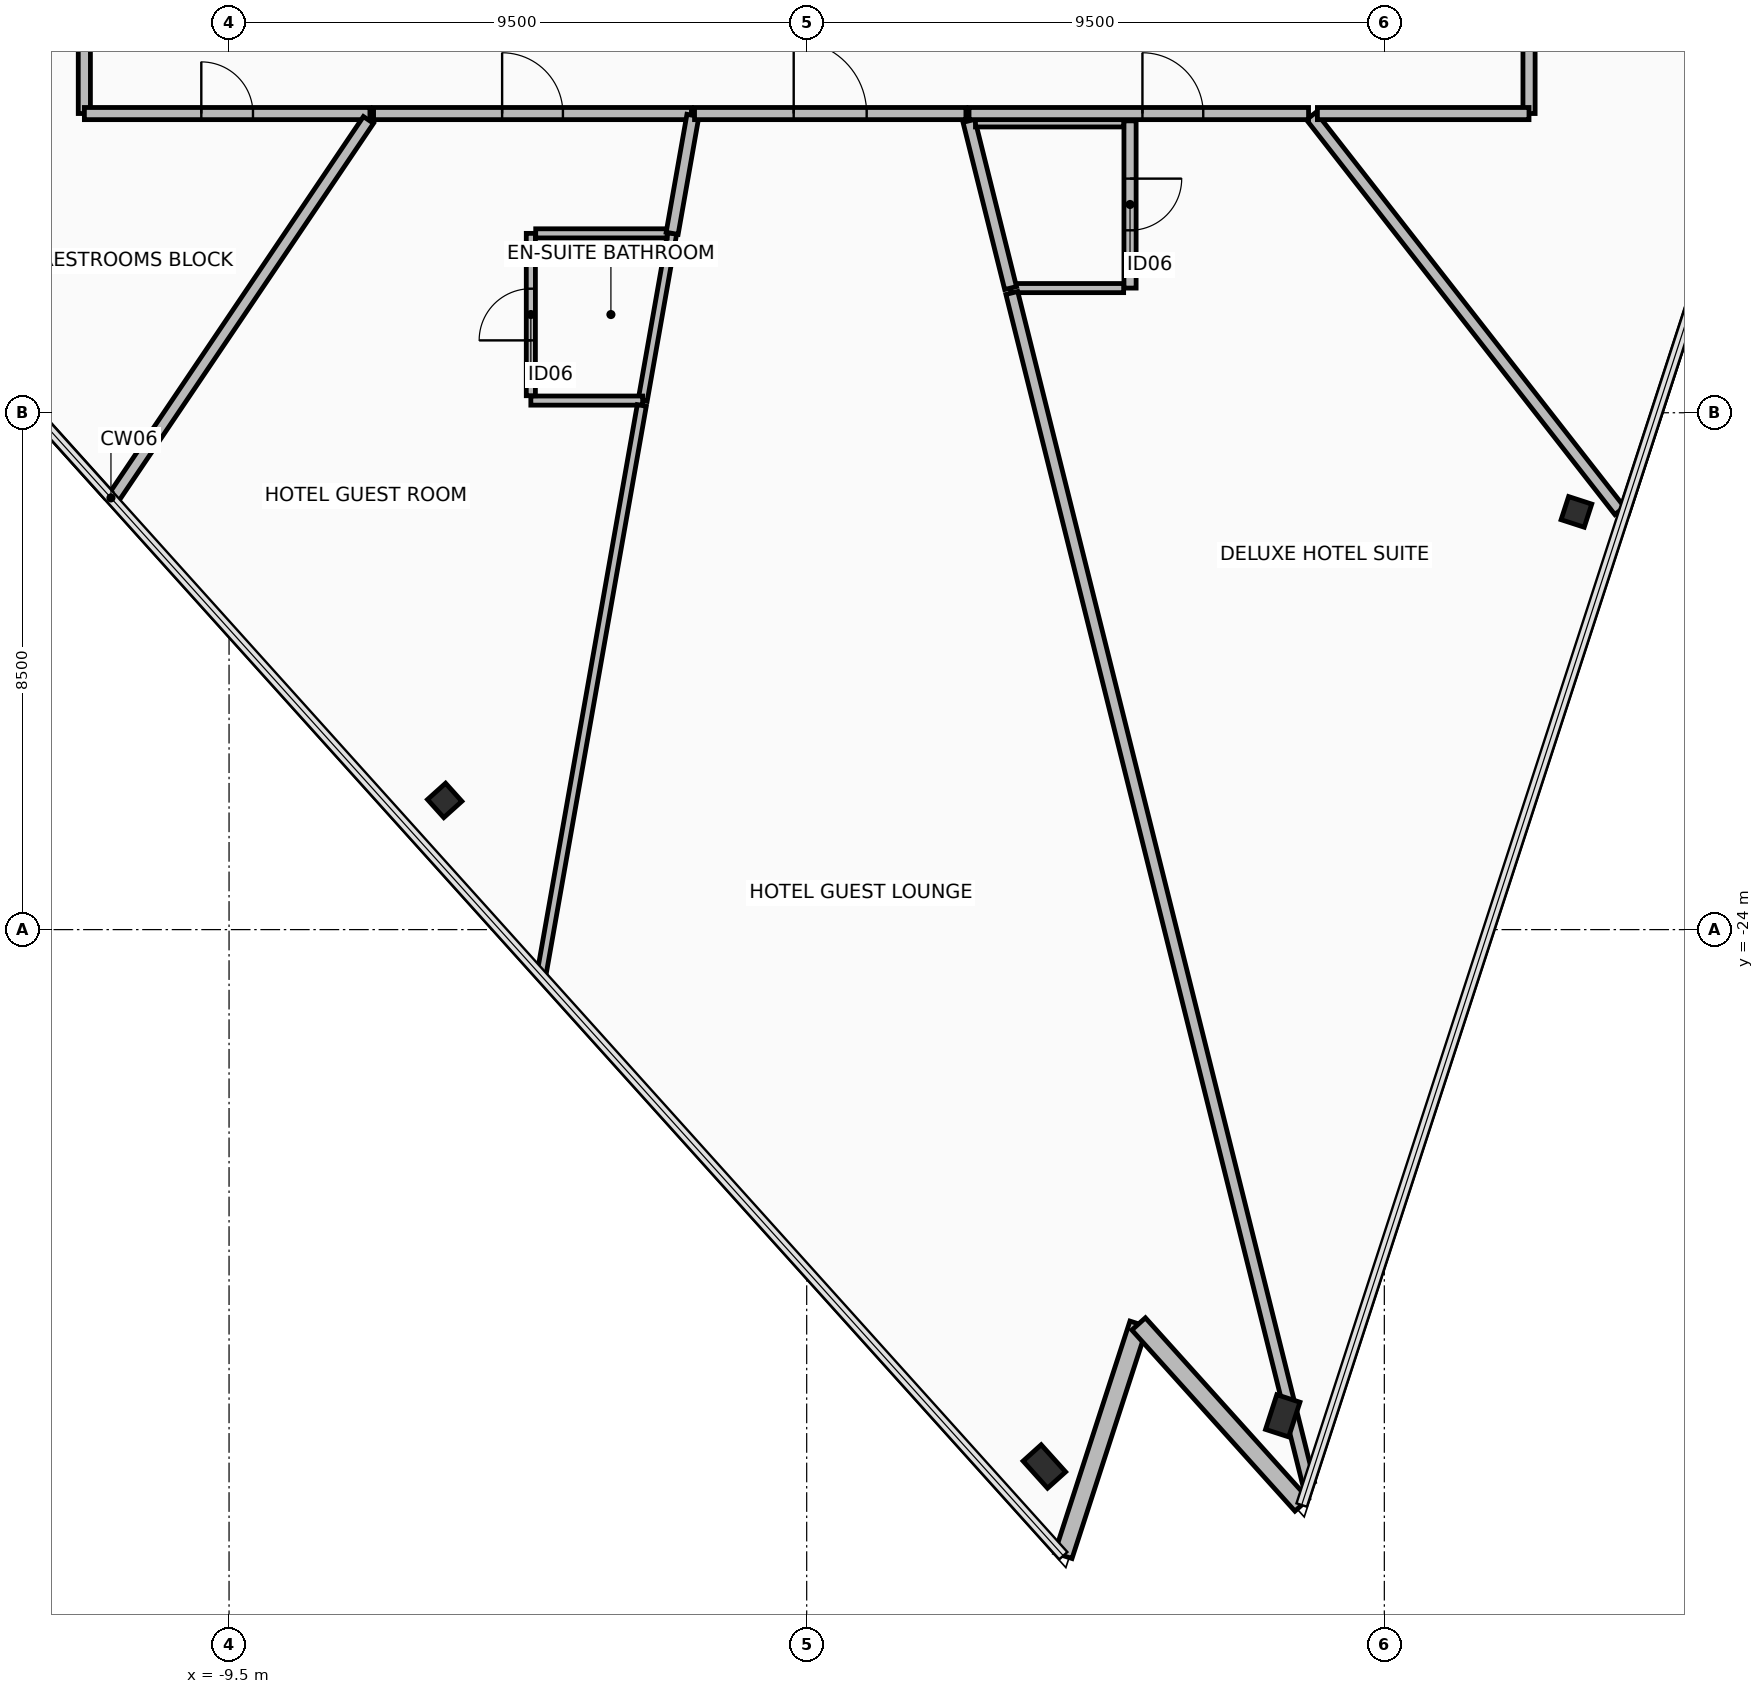
"""IFC4 building model, lengths in metres.
Left out: names, types, materials, properties, quantities, classifications, styles, units other than length and angle.
Written with IfcOpenShell. Run it as: python <this file> out.ifc"""

import sys

from ifc_helpers import new_model, si_unit, direction, frame, frame_2d, origin, origin_2d, place, context, subcontext, project, spatial, rectangle, hollow_rectangle, extrude, element, fill, save


model = new_model("IFC4")
c1 = context("Model", 3, precision=1e-05, world=origin(), true_north=direction((0.0, 1.0)))
c2 = subcontext(c1, "Body", "Model", "MODEL_VIEW")
j1 = project(units=[si_unit("LENGTHUNIT", "METRE"), si_unit("PLANEANGLEUNIT", "RADIAN")], contexts=[c1])
p1 = place(None, origin())
s1 = spatial("IfcSite", under=j1, at=p1, CompositionType="ELEMENT")
p2 = place(p1, origin())
s2 = spatial("IfcBuilding", under=s1, at=p2, CompositionType="ELEMENT")
p3 = place(p2, frame((0.0, 0.0, 294.35)))
s3 = spatial("IfcBuildingStorey", under=s2, at=p3, CompositionType="ELEMENT", Elevation=294.35)
p4 = place(p3, frame((-5.954, -21.875, 0.0), z_axis=(0.0, 0.0, 1.0), x_axis=(-0.669130606359, 0.743144825477, 0.0)))
e1 = element("IfcColumn", 1, at=p4, inside=s3, PredefinedType="COLUMN", context=c2, shape_type="SweptSolid", body=[
    extrude(hollow_rectangle(XDim=0.4, YDim=0.4, WallThickness=0.025, at=origin_2d()), origin(), (0.0, 0.0, 1.0), 3.65),
])
for number, where, z_axis, x_axis in (
    (2, (3.909, -32.829, 0.0), (0.0, 0.0, 1.0), (-0.669, 0.743, 0.0)),
    (3, (7.829, -31.996, 0.0), (0.0, 0.0, 1.0), (0.309, 0.951, 0.0)),
):
    element("IfcColumn", number, at=place(p3, frame(where, z_axis=z_axis, x_axis=x_axis)), inside=s3, PredefinedType="COLUMN", context=c2, shape_type="SweptSolid", body=[
        extrude(hollow_rectangle(XDim=0.4, YDim=0.6, WallThickness=0.03, at=origin_2d()), origin(), (0.0, 0.0, 1.0), 3.65),
    ])
p5 = place(p3, frame((12.659, -17.131, 0.0), z_axis=(0.0, 0.0, 1.0), x_axis=(0.309018654281, 0.951055976957, 0.0)))
e4 = element("IfcColumn", 4, at=p5, inside=s3, PredefinedType="COLUMN", context=c2, shape_type="SweptSolid", body=[
    extrude(hollow_rectangle(XDim=0.4, YDim=0.4, WallThickness=0.025, at=origin_2d()), origin(), (0.0, 0.0, 1.0), 3.65),
])
p6 = place(p3, frame((4.221, -34.296, 0.0), z_axis=(0.0, 0.0, 1.0), x_axis=(0.309018580232, 0.951056001018, 0.0)))
e5 = element("IfcWall", 5, at=p6, inside=s3, PredefinedType="STANDARD", context=c2, shape_type="SweptSolid", body=[
    extrude(rectangle(XDim=4.008, YDim=0.3, at=frame_2d((2.004, 0.0))), origin(), (0.0, 0.0, 1.0), 2.795),
])
p7 = place(p3, frame((5.459, -30.484, 0.0), z_axis=(0.0, 0.0, 1.0), x_axis=(0.669132983361, -0.743142685208, 0.0)))
e6 = element("IfcWall", 6, at=p7, inside=s3, PredefinedType="STANDARD", context=c2, shape_type="SweptSolid", body=[
    extrude(rectangle(XDim=4.008, YDim=0.3, at=frame_2d((2.004, 0.0))), origin(), (0.0, 0.0, 1.0), 2.795),
])
p8 = place(p3, frame((-2.213, -12.55, 0.0), z_axis=(0.0, 0.0, 1.0), x_axis=(-0.173635703618, -0.984809952442, 0.0)))
e7 = element("IfcWall", 7, at=p8, inside=s3, PredefinedType="PARTITIONING", context=c2, shape_type="SweptSolid", body=[
    extrude(rectangle(XDim=2.792, YDim=0.15, at=frame_2d((1.396, 0.0))), origin(), (0.0, 0.0, 1.0), 3.205),
])
p9 = place(p3, frame((-2.698, -15.3, 0.0), z_axis=(0.0, 0.0, 1.0), x_axis=(-1.0, 0.0, 0.0)))
e8 = element("IfcWall", 8, at=p9, inside=s3, PredefinedType="PARTITIONING", context=c2, shape_type="SweptSolid", body=[
    extrude(rectangle(XDim=1.839, YDim=0.15, at=frame_2d((0.919, 0.0))), origin(), (0.0, 0.0, 1.0), 3.45),
])
p10 = place(p3, frame((-4.537, -15.22, 0.0), z_axis=(0.0, 0.0, 1.0), x_axis=(0.0, 1.0, 0.0)))
e9 = element("IfcWall", 9, at=p10, inside=s3, PredefinedType="PARTITIONING", context=c2, shape_type="SweptSolid", body=[
    extrude(rectangle(XDim=2.67, YDim=0.15, at=frame_2d((1.335, 0.0))), origin(), (0.0, 0.0, 1.0), 2.945),
])
p11 = place(p10, frame((0.91, 0.0, 0.0)))
e10 = element("IfcOpeningElement", 10, at=p11, cuts=e9, PredefinedType="OPENING", context=c2, shape_type="SweptSolid", body=[
    extrude(rectangle(XDim=0.85, YDim=2.1, at=frame_2d((0.425, 1.05))), frame((0.0, 0.085, 0.0), z_axis=(0.0, -1.0, 0.0), x_axis=(1.0, 0.0, 0.0)), (0.0, 0.0, 1.0), 0.17),
])
p12 = place(p3, frame((-4.457, -12.55, 0.0), z_axis=(0.0, 0.0, 1.0), x_axis=(1.0, 0.0, 0.0)))
e11 = element("IfcWall", 11, at=p12, inside=s3, PredefinedType="PARTITIONING", context=c2, shape_type="SweptSolid", body=[
    extrude(rectangle(XDim=2.163, YDim=0.15, at=frame_2d((1.081, 0.0))), origin(), (0.0, 0.0, 1.0), 2.945),
])
p13 = place(p3, frame((5.318, -10.7, 0.0), z_axis=(0.0, 0.0, 1.0), x_axis=(0.0, -1.0, 0.0)))
e12 = element("IfcWall", 12, at=p13, inside=s3, PredefinedType="PARTITIONING", context=c2, shape_type="SweptSolid", body=[
    extrude(rectangle(XDim=2.75, YDim=0.2, at=frame_2d((1.375, 0.0))), origin(), (0.0, 0.0, 1.0), 3.45),
])
p14 = place(p13, frame((0.95, 0.0, 0.0)))
e13 = element("IfcOpeningElement", 13, at=p14, cuts=e12, PredefinedType="OPENING", context=c2, shape_type="SweptSolid", body=[
    extrude(rectangle(XDim=0.85, YDim=2.1, at=frame_2d((0.425, 1.05))), frame((0.0, 0.11, 0.0), z_axis=(0.0, -1.0, 0.0), x_axis=(1.0, 0.0, 0.0)), (0.0, 0.0, 1.0), 0.22),
])
p15 = place(p3, frame((5.213, -13.45, 0.0), z_axis=(0.0, 0.0, 1.0), x_axis=(-1.0, 0.0, 0.0)))
e14 = element("IfcWall", 14, at=p15, inside=s3, PredefinedType="PARTITIONING", context=c2, shape_type="SweptSolid", body=[
    extrude(rectangle(XDim=1.859, YDim=0.15, at=frame_2d((0.93, 0.0))), origin(), (0.0, 0.0, 1.0), 3.45),
])
p16 = place(p3, frame((3.354, -13.45, 0.0), z_axis=(0.0, 0.0, 1.0), x_axis=(-0.241968071048, 0.970284212277, 0.0)))
e15 = element("IfcWall", 15, at=p16, inside=s3, PredefinedType="PARTITIONING", context=c2, shape_type="SweptSolid", body=[
    extrude(rectangle(XDim=2.834, YDim=0.2, at=frame_2d((1.417, 0.0))), origin(), (0.0, 0.0, 1.0), 3.45),
])
p17 = place(p3, frame((2.776, -10.7, 0.0), z_axis=(0.0, 0.0, 1.0), x_axis=(1.0, 0.0, 0.0)))
e16 = element("IfcWall", 16, at=p17, inside=s3, PredefinedType="PARTITIONING", context=c2, shape_type="SweptSolid", body=[
    extrude(rectangle(XDim=2.437, YDim=0.2, at=frame_2d((1.219, 0.0))), origin(), (0.0, 0.0, 1.0), 3.45),
])
p18 = place(p3, frame((-17.035, -10.645, 0.0), z_axis=(0.0, 0.0, 1.0), x_axis=(0.848052853046, 0.529911651543, 0.0)))
e17 = element("IfcWall", 17, at=p18, inside=s3, PredefinedType="PARTITIONING", context=c2, shape_type="SweptSolid", body=[
    extrude(rectangle(XDim=6.034, YDim=0.2, at=frame_2d((3.017, 0.0))), origin(), (0.0, 0.0, 1.0), 2.795),
])
p19 = place(p3, frame((-11.88, -7.547, 0.0), z_axis=(0.0, 0.0, 1.0), x_axis=(0.0, -1.0, 0.0)))
e18 = element("IfcWall", 18, at=p19, inside=s3, PredefinedType="PARTITIONING", context=c2, shape_type="SweptSolid", body=[
    extrude(rectangle(XDim=3.032, YDim=0.2, at=frame_2d((1.516, 0.0))), origin(), (0.0, 0.0, 1.0), 2.945),
])
p20 = place(p3, frame((-11.879, -10.58, 0.0), z_axis=(0.0, 0.0, 1.0), x_axis=(1.0, 0.0, 0.0)))
e19 = element("IfcWall", 19, at=p20, inside=s3, PredefinedType="PARTITIONING", context=c2, shape_type="SweptSolid", body=[
    extrude(rectangle(XDim=4.696, YDim=0.2, at=frame_2d((2.348, 0.0))), origin(), (0.0, 0.0, 1.0), 3.205),
])
p21 = place(p20, frame((1.923, 0.0, 0.0)))
e20 = element("IfcOpeningElement", 20, at=p21, cuts=e19, PredefinedType="OPENING", context=c2, shape_type="SweptSolid", body=[
    extrude(rectangle(XDim=0.85, YDim=2.1, at=frame_2d((0.425, 1.05))), frame((0.0, 0.11, 0.0), z_axis=(0.0, -1.0, 0.0), x_axis=(1.0, 0.0, 0.0)), (0.0, 0.0, 1.0), 0.22),
])
p22 = place(p3, frame((-7.207, -10.685, 0.0), z_axis=(0.0, 0.0, 1.0), x_axis=(-0.559203861497, -0.829030181168, 0.0)))
e21 = element("IfcWall", 21, at=p22, inside=s3, PredefinedType="PARTITIONING", context=c2, shape_type="SweptSolid", body=[
    extrude(rectangle(XDim=7.53, YDim=0.2, at=frame_2d((3.765, 0.0))), origin(), (0.0, 0.0, 1.0), 2.795),
])
p23 = place(p3, frame((-11.49, -16.847, 0.0), z_axis=(0.0, 0.0, 1.0), x_axis=(-0.669125702068, 0.743149241291, 0.0)))
e22 = element("IfcWall", 22, at=p23, inside=s3, PredefinedType="PARTITIONING", context=c2, shape_type="SweptSolid", body=[
    extrude(rectangle(XDim=8.295, YDim=0.15, at=frame_2d((4.147, 0.0))), origin(), (0.0, 0.0, 1.0), 3.45),
])
p24 = place(p3, frame((11.88, -10.579, 0.0), z_axis=(0.0, 0.0, 1.0), x_axis=(0.0, 1.0, 0.0)))
e23 = element("IfcWall", 23, at=p24, inside=s3, PredefinedType="PARTITIONING", context=c2, shape_type="SweptSolid", body=[
    extrude(rectangle(XDim=4.221, YDim=0.2, at=frame_2d((2.11, 0.0))), origin(), (0.0, 0.0, 1.0), 3.205),
])
p25 = place(p24, frame((1.686, 0.0, 0.0)))
e24 = element("IfcOpeningElement", 24, at=p25, cuts=e23, PredefinedType="OPENING", context=c2, shape_type="SweptSolid", body=[
    extrude(rectangle(XDim=0.85, YDim=2.1, at=frame_2d((0.425, 1.05))), frame((0.0, 0.11, 0.0), z_axis=(0.0, -1.0, 0.0), x_axis=(1.0, 0.0, 0.0)), (0.0, 0.0, 1.0), 0.22),
])
p26 = place(p3, frame((16.206, -8.64, 0.0), z_axis=(0.0, 0.0, 1.0), x_axis=(-0.308993456207, -0.951064163988, 0.0)))
e25 = element("IfcWall", 25, at=p26, inside=s3, PredefinedType="PARTITIONING", context=c2, shape_type="SweptSolid", body=[
    extrude(rectangle(XDim=8.941, YDim=0.15, at=frame_2d((4.47, 0.0))), origin(), (0.0, 0.0, 1.0), 3.45),
])
p27 = place(p3, frame((13.37, -17.112, 0.0), z_axis=(0.0, 0.0, 1.0), x_axis=(-0.615658418865, 0.788013141566, 0.0)))
e26 = element("IfcWall", 26, at=p27, inside=s3, PredefinedType="PARTITIONING", context=c2, shape_type="SweptSolid", body=[
    extrude(rectangle(XDim=8.238, YDim=0.2, at=frame_2d((4.119, 0.0))), origin(), (0.0, 0.0, 1.0), 2.795),
])
p28 = place(p3, frame((8.399, -10.58, 0.0), z_axis=(0.0, 0.0, 1.0), x_axis=(1.0, 0.0, 0.0)))
e27 = element("IfcWall", 27, at=p28, inside=s3, PredefinedType="PARTITIONING", context=c2, shape_type="SweptSolid", body=[
    extrude(rectangle(XDim=3.48, YDim=0.2, at=frame_2d((1.74, 0.0))), origin(), (0.0, 0.0, 1.0), 2.945),
])
p29 = place(p3, frame((-7.123, -10.58, 0.0), z_axis=(0.0, 0.0, 1.0), x_axis=(1.0, 0.0, 0.0)))
e28 = element("IfcWall", 28, at=p29, inside=s3, PredefinedType="PARTITIONING", context=c2, shape_type="SweptSolid", body=[
    extrude(rectangle(XDim=5.228, YDim=0.2, at=frame_2d((2.614, 0.0))), origin(), (0.0, 0.0, 1.0), 2.945),
])
p30 = place(p29, frame((2.114, 0.0, 0.0)))
e29 = element("IfcOpeningElement", 29, at=p30, cuts=e28, PredefinedType="OPENING", context=c2, shape_type="SweptSolid", body=[
    extrude(rectangle(XDim=1.0, YDim=2.15, at=frame_2d((0.5, 1.075))), frame((0.0, 0.11, 0.0), z_axis=(0.0, -1.0, 0.0), x_axis=(1.0, 0.0, 0.0)), (0.0, 0.0, 1.0), 0.22),
])
p31 = place(p3, frame((-1.871, -10.609, 0.0), z_axis=(0.0, 0.0, 1.0), x_axis=(-0.17369345517, -0.984799768294, 0.0)))
e30 = element("IfcWall", 30, at=p31, inside=s3, PredefinedType="PARTITIONING", context=c2, shape_type="SweptSolid", body=[
    extrude(rectangle(XDim=1.971, YDim=0.2, at=frame_2d((0.985, 0.0))), origin(), (0.0, 0.0, 1.0), 3.45),
])
p32 = place(p3, frame((-2.712, -15.38, 0.0), z_axis=(0.0, 0.0, 1.0), x_axis=(-0.173640563607, -0.984809095546, 0.0)))
e31 = element("IfcWall", 31, at=p32, inside=s3, PredefinedType="PARTITIONING", context=c2, shape_type="SweptSolid", body=[
    extrude(rectangle(XDim=9.524, YDim=0.15, at=frame_2d((4.762, 0.0))), origin(), (0.0, 0.0, 1.0), 2.795),
])
p33 = place(p3, frame((-1.844, -10.58, 0.0), z_axis=(0.0, 0.0, 1.0), x_axis=(1.0, 0.0, 0.0)))
e32 = element("IfcWall", 32, at=p33, inside=s3, PredefinedType="PARTITIONING", context=c2, shape_type="SweptSolid", body=[
    extrude(rectangle(XDim=4.463, YDim=0.2, at=frame_2d((2.231, 0.0))), origin(), (0.0, 0.0, 1.0), 3.45),
])
p34 = place(p33, frame((1.631, 0.0, 0.0)))
e33 = element("IfcOpeningElement", 33, at=p34, cuts=e32, PredefinedType="OPENING", context=c2, shape_type="SweptSolid", body=[
    extrude(rectangle(XDim=1.2, YDim=2.15, at=frame_2d((0.6, 1.075))), frame((0.0, 0.11, 0.0), z_axis=(0.0, -1.0, 0.0), x_axis=(1.0, 0.0, 0.0)), (0.0, 0.0, 1.0), 0.22),
])
p35 = place(p3, frame((3.373, -13.53, 0.0), z_axis=(0.0, 0.0, 1.0), x_axis=(0.24193474073, -0.970292523535, 0.0)))
e34 = element("IfcWall", 34, at=p35, inside=s3, PredefinedType="PARTITIONING", context=c2, shape_type="SweptSolid", body=[
    extrude(rectangle(XDim=20.173, YDim=0.2, at=frame_2d((10.087, 0.0))), origin(), (0.0, 0.0, 1.0), 2.795),
])
p36 = place(p3, frame((2.67, -10.58, 0.0), z_axis=(0.0, 0.0, 1.0), x_axis=(1.0, 0.0, 0.0)))
e35 = element("IfcWall", 35, at=p36, inside=s3, PredefinedType="PARTITIONING", context=c2, shape_type="SweptSolid", body=[
    extrude(rectangle(XDim=5.584, YDim=0.2, at=frame_2d((2.792, 0.0))), origin(), (0.0, 0.0, 1.0), 2.945),
])
p37 = place(p36, frame((2.852, 0.0, 0.0)))
e36 = element("IfcOpeningElement", 36, at=p37, cuts=e35, PredefinedType="OPENING", context=c2, shape_type="SweptSolid", body=[
    extrude(rectangle(XDim=1.0, YDim=2.15, at=frame_2d((0.5, 1.075))), frame((0.0, 0.11, 0.0), z_axis=(0.0, -1.0, 0.0), x_axis=(1.0, 0.0, 0.0)), (0.0, 0.0, 1.0), 0.22),
])
p38 = place(p11, origin())
e37 = element("IfcDoor", 37, at=p38, inside=s3, OperationType="SINGLE_SWING_RIGHT", PredefinedType="DOOR", context=c2, shape_type="SweptSolid", body=[
    extrude(rectangle(XDim=0.85, YDim=2.1, at=frame_2d((0.425, 1.05))), frame((0.0, 0.025, 0.0), z_axis=(0.0, -1.0, 0.0), x_axis=(1.0, 0.0, 0.0)), (0.0, 0.0, 1.0), 0.05),
])
fill(e10, e37)
p39 = place(p14, origin())
e38 = element("IfcDoor", 38, at=p39, inside=s3, OperationType="SINGLE_SWING_RIGHT", PredefinedType="DOOR", context=c2, shape_type="SweptSolid", body=[
    extrude(rectangle(XDim=0.85, YDim=2.1, at=frame_2d((0.425, 1.05))), frame((0.0, 0.025, 0.0), z_axis=(0.0, -1.0, 0.0), x_axis=(1.0, 0.0, 0.0)), (0.0, 0.0, 1.0), 0.05),
])
fill(e13, e38)
p40 = place(p21, origin())
e39 = element("IfcDoor", 39, at=p40, inside=s3, OperationType="SINGLE_SWING_RIGHT", PredefinedType="DOOR", context=c2, shape_type="SweptSolid", body=[
    extrude(rectangle(XDim=0.85, YDim=2.1, at=frame_2d((0.425, 1.05))), frame((0.0, 0.025, 0.0), z_axis=(0.0, -1.0, 0.0), x_axis=(1.0, 0.0, 0.0)), (0.0, 0.0, 1.0), 0.05),
])
fill(e20, e39)
p41 = place(p30, origin())
e40 = element("IfcDoor", 40, at=p41, inside=s3, OperationType="SINGLE_SWING_LEFT", PredefinedType="DOOR", context=c2, shape_type="SweptSolid", body=[
    extrude(rectangle(XDim=1.0, YDim=2.15, at=frame_2d((0.5, 1.075))), frame((0.0, 0.025, 0.0), z_axis=(0.0, -1.0, 0.0), x_axis=(1.0, 0.0, 0.0)), (0.0, 0.0, 1.0), 0.05),
])
fill(e29, e40)
p42 = place(p34, origin())
e41 = element("IfcDoor", 41, at=p42, inside=s3, OperationType="SINGLE_SWING_LEFT", PredefinedType="DOOR", context=c2, shape_type="SweptSolid", body=[
    extrude(rectangle(XDim=1.2, YDim=2.15, at=frame_2d((0.6, 1.075))), frame((0.0, 0.025, 0.0), z_axis=(0.0, -1.0, 0.0), x_axis=(1.0, 0.0, 0.0)), (0.0, 0.0, 1.0), 0.05),
])
fill(e33, e41)
p43 = place(p37, origin())
e42 = element("IfcDoor", 42, at=p43, inside=s3, OperationType="SINGLE_SWING_LEFT", PredefinedType="DOOR", context=c2, shape_type="SweptSolid", body=[
    extrude(rectangle(XDim=1.0, YDim=2.15, at=frame_2d((0.5, 1.075))), frame((0.0, 0.025, 0.0), z_axis=(0.0, -1.0, 0.0), x_axis=(1.0, 0.0, 0.0)), (0.0, 0.0, 1.0), 0.05),
])
fill(e36, e42)
save(model, sys.argv[1])
